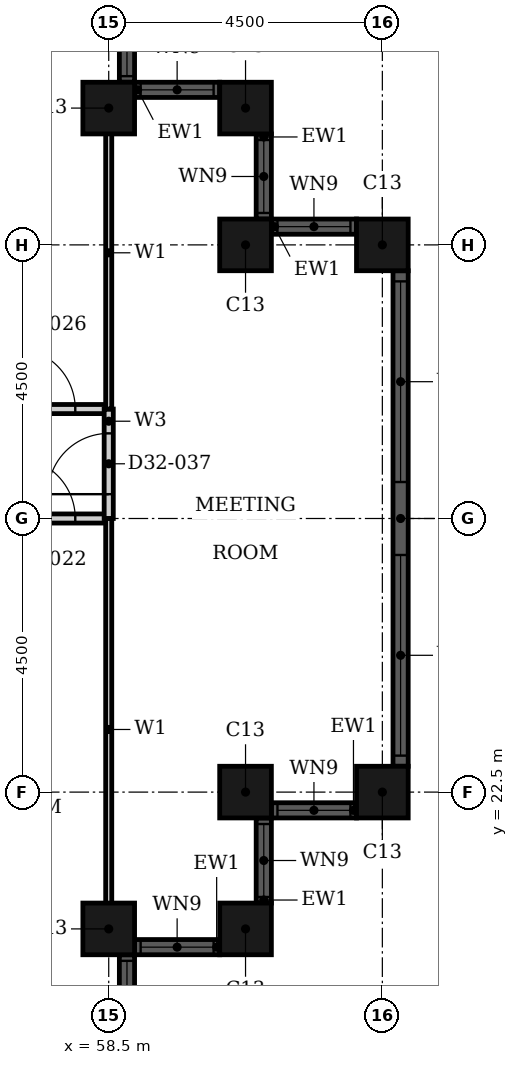
"""IFC4 building model, lengths in metres.
Left out: names, types, materials, properties, quantities, classifications, styles, units other than length and angle.
Written with IfcOpenShell. Run it as: python <this file> out.ifc"""

import sys

from ifc_helpers import new_model, si_unit, direction, frame, frame_2d, origin, origin_2d, place, context, subcontext, project, spatial, rectangle, hollow_rectangle, extrude, element, fill, save


model = new_model("IFC4")
c1 = context("Model", 3, precision=1e-05, world=origin(), true_north=direction((0.0, 1.0)))
c2 = subcontext(c1, "Body", "Model", "MODEL_VIEW")
j1 = project(units=[si_unit("LENGTHUNIT", "METRE"), si_unit("PLANEANGLEUNIT", "RADIAN")], contexts=[c1])
p1 = place(None, origin())
s1 = spatial("IfcSite", under=j1, at=p1, CompositionType="ELEMENT")
p2 = place(p1, origin())
s2 = spatial("IfcBuilding", under=s1, at=p2, CompositionType="ELEMENT")
p3 = place(p2, frame((0.0, 0.0, 129.6)))
s3 = spatial("IfcBuildingStorey", under=s2, at=p3, CompositionType="ELEMENT", Elevation=129.6)
for number, where, z_axis, x_axis in (
    (1, (58.5, 20.25, 0.0), (0.0, 0.0, 1.0), (1.0, 0.0, 0.0)),
    (2, (60.75, 20.25, 0.0), (0.0, 0.0, 1.0), (1.0, 0.0, 0.0)),
    (3, (60.75, 22.5, 0.0), (0.0, 0.0, 1.0), (1.0, 0.0, 0.0)),
    (4, (63.0, 22.5, 0.0), (0.0, 0.0, 1.0), (1.0, 0.0, 0.0)),
    (5, (63.0, 31.5, 0.0), (0.0, 0.0, 1.0), (1.0, 0.0, 0.0)),
    (6, (60.75, 31.5, 0.0), (0.0, 0.0, 1.0), (1.0, 0.0, 0.0)),
    (7, (60.75, 33.75, 0.0), (0.0, 0.0, 1.0), (1.0, 0.0, 0.0)),
    (8, (58.5, 33.75, 0.0), (0.0, 0.0, 1.0), (1.0, 0.0, 0.0)),
):
    element("IfcColumn", number, at=place(p3, frame(where, z_axis=z_axis, x_axis=x_axis)), inside=s3, PredefinedType="COLUMN", context=c2, shape_type="SweptSolid", body=[
        extrude(hollow_rectangle(XDim=0.85, YDim=0.85, WallThickness=0.026, at=origin_2d()), origin(), (0.0, 0.0, 1.0), 3.6),
    ])
p4 = place(p3, frame((58.8, 18.425, 0.0), z_axis=(0.0, 0.0, 1.0), x_axis=(0.0, 1.0, 0.0)))
e9 = element("IfcWall", 9, at=p4, inside=s3, PredefinedType="SOLIDWALL", context=c2, shape_type="SweptSolid", body=[
    extrude(rectangle(XDim=1.4, YDim=0.25, at=frame_2d((0.7, 0.0))), origin(), (0.0, 0.0, 1.0), 3.6),
])
p5 = place(p4, frame((0.1, 0.0, 0.9)))
e10 = element("IfcOpeningElement", 10, at=p5, cuts=e9, PredefinedType="OPENING", context=c2, shape_type="SweptSolid", body=[
    extrude(rectangle(XDim=1.2, YDim=2.08, at=frame_2d((0.6, 1.04))), frame((0.0, 0.135, 0.0), z_axis=(0.0, -1.0, 0.0), x_axis=(1.0, 0.0, 0.0)), (0.0, 0.0, 1.0), 0.27),
])
p6 = place(p3, frame((58.925, 19.95, 0.0), z_axis=(0.0, 0.0, 1.0), x_axis=(1.0, 0.0, 0.0)))
e11 = element("IfcWall", 11, at=p6, inside=s3, PredefinedType="SOLIDWALL", context=c2, shape_type="SweptSolid", body=[
    extrude(rectangle(XDim=1.4, YDim=0.25, at=frame_2d((0.7, 0.0))), origin(), (0.0, 0.0, 1.0), 3.6),
])
p7 = place(p6, frame((0.1, 0.0, 0.9)))
e12 = element("IfcOpeningElement", 12, at=p7, cuts=e11, PredefinedType="OPENING", context=c2, shape_type="SweptSolid", body=[
    extrude(rectangle(XDim=1.2, YDim=2.08, at=frame_2d((0.6, 1.04))), frame((0.0, 0.135, 0.0), z_axis=(0.0, -1.0, 0.0), x_axis=(1.0, 0.0, 0.0)), (0.0, 0.0, 1.0), 0.27),
])
p8 = place(p3, frame((61.05, 20.675, 0.0), z_axis=(0.0, 0.0, 1.0), x_axis=(0.0, 1.0, 0.0)))
e13 = element("IfcWall", 13, at=p8, inside=s3, PredefinedType="SOLIDWALL", context=c2, shape_type="SweptSolid", body=[
    extrude(rectangle(XDim=1.4, YDim=0.25, at=frame_2d((0.7, 0.0))), origin(), (0.0, 0.0, 1.0), 3.6),
])
p9 = place(p8, frame((0.1, 0.0, 0.9)))
e14 = element("IfcOpeningElement", 14, at=p9, cuts=e13, PredefinedType="OPENING", context=c2, shape_type="SweptSolid", body=[
    extrude(rectangle(XDim=1.2, YDim=2.08, at=frame_2d((0.6, 1.04))), frame((0.0, 0.135, 0.0), z_axis=(0.0, -1.0, 0.0), x_axis=(1.0, 0.0, 0.0)), (0.0, 0.0, 1.0), 0.27),
])
p10 = place(p3, frame((61.175, 22.2, 0.0), z_axis=(0.0, 0.0, 1.0), x_axis=(1.0, 0.0, 0.0)))
e15 = element("IfcWall", 15, at=p10, inside=s3, PredefinedType="SOLIDWALL", context=c2, shape_type="SweptSolid", body=[
    extrude(rectangle(XDim=1.4, YDim=0.25, at=frame_2d((0.7, 0.0))), origin(), (0.0, 0.0, 1.0), 3.6),
])
p11 = place(p10, frame((0.1, 0.0, 0.9)))
e16 = element("IfcOpeningElement", 16, at=p11, cuts=e15, PredefinedType="OPENING", context=c2, shape_type="SweptSolid", body=[
    extrude(rectangle(XDim=1.2, YDim=2.08, at=frame_2d((0.6, 1.04))), frame((0.0, 0.135, 0.0), z_axis=(0.0, -1.0, 0.0), x_axis=(1.0, 0.0, 0.0)), (0.0, 0.0, 1.0), 0.27),
])
p12 = place(p3, frame((63.3, 22.925, 0.0), z_axis=(0.0, 0.0, 1.0), x_axis=(0.0, 1.0, 0.0)))
e17 = element("IfcWall", 17, at=p12, inside=s3, PredefinedType="SOLIDWALL", context=c2, shape_type="SweptSolid", body=[
    extrude(rectangle(XDim=8.15, YDim=0.25, at=frame_2d((4.075, 0.0))), origin(), (0.0, 0.0, 1.0), 3.6),
])
p13 = place(p12, frame((0.175, 0.0, 0.9)))
e18 = element("IfcOpeningElement", 18, at=p13, cuts=e17, PredefinedType="OPENING", context=c2, shape_type="SweptSolid", body=[
    extrude(rectangle(XDim=3.3, YDim=2.08, at=frame_2d((1.65, 1.04))), frame((0.0, 0.135, 0.0), z_axis=(0.0, -1.0, 0.0), x_axis=(1.0, 0.0, 0.0)), (0.0, 0.0, 1.0), 0.27),
])
p14 = place(p12, frame((4.675, 0.0, 0.9)))
e19 = element("IfcOpeningElement", 19, at=p14, cuts=e17, PredefinedType="OPENING", context=c2, shape_type="SweptSolid", body=[
    extrude(rectangle(XDim=3.3, YDim=2.08, at=frame_2d((1.65, 1.04))), frame((0.0, 0.135, 0.0), z_axis=(0.0, -1.0, 0.0), x_axis=(1.0, 0.0, 0.0)), (0.0, 0.0, 1.0), 0.27),
])
p15 = place(p3, frame((62.575, 31.8, 0.0), z_axis=(0.0, 0.0, 1.0), x_axis=(-1.0, 0.0, 0.0)))
e20 = element("IfcWall", 20, at=p15, inside=s3, PredefinedType="SOLIDWALL", context=c2, shape_type="SweptSolid", body=[
    extrude(rectangle(XDim=1.4, YDim=0.25, at=frame_2d((0.7, 0.0))), origin(), (0.0, 0.0, 1.0), 3.6),
])
p16 = place(p15, frame((0.1, 0.0, 0.9)))
e21 = element("IfcOpeningElement", 21, at=p16, cuts=e20, PredefinedType="OPENING", context=c2, shape_type="SweptSolid", body=[
    extrude(rectangle(XDim=1.2, YDim=2.08, at=frame_2d((0.6, 1.04))), frame((0.0, 0.135, 0.0), z_axis=(0.0, -1.0, 0.0), x_axis=(1.0, 0.0, 0.0)), (0.0, 0.0, 1.0), 0.27),
])
p17 = place(p3, frame((61.05, 31.925, 0.0), z_axis=(0.0, 0.0, 1.0), x_axis=(0.0, 1.0, 0.0)))
e22 = element("IfcWall", 22, at=p17, inside=s3, PredefinedType="SOLIDWALL", context=c2, shape_type="SweptSolid", body=[
    extrude(rectangle(XDim=1.4, YDim=0.25, at=frame_2d((0.7, 0.0))), origin(), (0.0, 0.0, 1.0), 3.6),
])
p18 = place(p17, frame((0.1, 0.0, 0.9)))
e23 = element("IfcOpeningElement", 23, at=p18, cuts=e22, PredefinedType="OPENING", context=c2, shape_type="SweptSolid", body=[
    extrude(rectangle(XDim=1.2, YDim=2.08, at=frame_2d((0.6, 1.04))), frame((0.0, 0.135, 0.0), z_axis=(0.0, -1.0, 0.0), x_axis=(1.0, 0.0, 0.0)), (0.0, 0.0, 1.0), 0.27),
])
p19 = place(p3, frame((60.325, 34.05, 0.0), z_axis=(0.0, 0.0, 1.0), x_axis=(-1.0, 0.0, 0.0)))
e24 = element("IfcWall", 24, at=p19, inside=s3, PredefinedType="SOLIDWALL", context=c2, shape_type="SweptSolid", body=[
    extrude(rectangle(XDim=1.4, YDim=0.25, at=frame_2d((0.7, 0.0))), origin(), (0.0, 0.0, 1.0), 3.6),
])
p20 = place(p19, frame((0.1, 0.0, 0.9)))
e25 = element("IfcOpeningElement", 25, at=p20, cuts=e24, PredefinedType="OPENING", context=c2, shape_type="SweptSolid", body=[
    extrude(rectangle(XDim=1.2, YDim=2.08, at=frame_2d((0.6, 1.04))), frame((0.0, 0.135, 0.0), z_axis=(0.0, -1.0, 0.0), x_axis=(1.0, 0.0, 0.0)), (0.0, 0.0, 1.0), 0.27),
])
p21 = place(p3, frame((58.8, 34.175, 0.0), z_axis=(0.0, 0.0, 1.0), x_axis=(0.0, 1.0, 0.0)))
e26 = element("IfcWall", 26, at=p21, inside=s3, PredefinedType="SOLIDWALL", context=c2, shape_type="SweptSolid", body=[
    extrude(rectangle(XDim=1.4, YDim=0.25, at=frame_2d((0.7, 0.0))), origin(), (0.0, 0.0, 1.0), 3.6),
])
p22 = place(p21, frame((0.1, 0.0, 0.9)))
e27 = element("IfcOpeningElement", 27, at=p22, cuts=e26, PredefinedType="OPENING", context=c2, shape_type="SweptSolid", body=[
    extrude(rectangle(XDim=1.2, YDim=2.08, at=frame_2d((0.6, 1.04))), frame((0.0, 0.135, 0.0), z_axis=(0.0, -1.0, 0.0), x_axis=(1.0, 0.0, 0.0)), (0.0, 0.0, 1.0), 0.27),
])
p23 = place(p3, frame((46.8, 27.0, 0.0), z_axis=(0.0, 0.0, 1.0), x_axis=(1.0, 0.0, 0.0)))
e28 = element("IfcWall", 28, at=p23, inside=s3, PredefinedType="PARTITIONING", context=c2, shape_type="SweptSolid", body=[
    extrude(rectangle(XDim=11.7, YDim=0.15, at=frame_2d((5.85, 0.0))), origin(), (0.0, 0.0, 1.0), 2.58),
])
p24 = place(p23, frame((5.65, 0.0, 0.0)))
e29 = element("IfcOpeningElement", 29, at=p24, cuts=e28, PredefinedType="OPENING", context=c2, shape_type="SweptSolid", body=[
    extrude(rectangle(XDim=1.0, YDim=2.1, at=frame_2d((0.5, 1.05))), frame((0.0, 0.085, 0.0), z_axis=(0.0, -1.0, 0.0), x_axis=(1.0, 0.0, 0.0)), (0.0, 0.0, 1.0), 0.17),
])
p25 = place(p23, frame((10.15, 0.0, 0.0)))
e30 = element("IfcOpeningElement", 30, at=p25, cuts=e28, PredefinedType="OPENING", context=c2, shape_type="SweptSolid", body=[
    extrude(rectangle(XDim=1.0, YDim=2.1, at=frame_2d((0.5, 1.05))), frame((0.0, 0.085, 0.0), z_axis=(0.0, -1.0, 0.0), x_axis=(1.0, 0.0, 0.0)), (0.0, 0.0, 1.0), 0.17),
])
p26 = place(p3, frame((46.8, 28.8, 0.0), z_axis=(0.0, 0.0, 1.0), x_axis=(1.0, 0.0, 0.0)))
e31 = element("IfcWall", 31, at=p26, inside=s3, PredefinedType="PARTITIONING", context=c2, shape_type="SweptSolid", body=[
    extrude(rectangle(XDim=11.7, YDim=0.15, at=frame_2d((5.85, 0.0))), origin(), (0.0, 0.0, 1.0), 3.3),
])
p27 = place(p26, frame((5.65, 0.0, 0.0)))
e32 = element("IfcOpeningElement", 32, at=p27, cuts=e31, PredefinedType="OPENING", context=c2, shape_type="SweptSolid", body=[
    extrude(rectangle(XDim=1.0, YDim=2.1, at=frame_2d((0.5, 1.05))), frame((0.0, 0.085, 0.0), z_axis=(0.0, -1.0, 0.0), x_axis=(1.0, 0.0, 0.0)), (0.0, 0.0, 1.0), 0.17),
])
p28 = place(p26, frame((10.15, 0.0, 0.0)))
e33 = element("IfcOpeningElement", 33, at=p28, cuts=e31, PredefinedType="OPENING", context=c2, shape_type="SweptSolid", body=[
    extrude(rectangle(XDim=1.0, YDim=2.1, at=frame_2d((0.5, 1.05))), frame((0.0, 0.085, 0.0), z_axis=(0.0, -1.0, 0.0), x_axis=(1.0, 0.0, 0.0)), (0.0, 0.0, 1.0), 0.17),
])
p29 = place(p3, frame((58.5, 27.0, 0.0), z_axis=(0.0, 0.0, 1.0), x_axis=(0.0, 1.0, 0.0)))
e34 = element("IfcWall", 34, at=p29, inside=s3, PredefinedType="PARTITIONING", context=c2, shape_type="SweptSolid", body=[
    extrude(rectangle(XDim=1.8, YDim=0.15, at=frame_2d((0.9, 0.0))), origin(), (0.0, 0.0, 1.0), 3.3),
])
p30 = place(p29, frame((0.4, 0.0, 0.0)))
e35 = element("IfcOpeningElement", 35, at=p30, cuts=e34, PredefinedType="OPENING", context=c2, shape_type="SweptSolid", body=[
    extrude(rectangle(XDim=1.0, YDim=2.1, at=frame_2d((0.5, 1.05))), frame((0.0, 0.085, 0.0), z_axis=(0.0, -1.0, 0.0), x_axis=(1.0, 0.0, 0.0)), (0.0, 0.0, 1.0), 0.17),
])
p31 = place(p3, frame((58.5, 28.8, 0.0), z_axis=(0.0, 0.0, 1.0), x_axis=(0.0, 1.0, 0.0)))
e36 = element("IfcWall", 36, at=p31, inside=s3, PredefinedType="PARTITIONING", context=c2, shape_type="SweptSolid", body=[
    extrude(rectangle(XDim=5.14, YDim=0.1, at=frame_2d((2.57, 0.0))), origin(), (0.0, 0.0, 1.0), 3.3),
])
p32 = place(p3, frame((58.5, 20.06, 0.0), z_axis=(0.0, 0.0, 1.0), x_axis=(0.0, 1.0, 0.0)))
e37 = element("IfcWall", 37, at=p32, inside=s3, PredefinedType="PARTITIONING", context=c2, shape_type="SweptSolid", body=[
    extrude(rectangle(XDim=6.94, YDim=0.1, at=frame_2d((3.47, 0.0))), origin(), (0.0, 0.0, 1.0), 3.3),
])
p33 = place(p5, origin())
e38 = element("IfcWindow", 38, at=p33, inside=s3, PartitioningType="SINGLE_PANEL", PredefinedType="WINDOW", context=c2, shape_type="SweptSolid", body=[
    extrude(rectangle(XDim=1.2, YDim=2.08, at=frame_2d((0.6, 1.04))), frame((0.0, 0.03, 0.0), z_axis=(0.0, -1.0, 0.0), x_axis=(1.0, 0.0, 0.0)), (0.0, 0.0, 1.0), 0.06),
])
fill(e10, e38)
p34 = place(p7, origin())
e39 = element("IfcWindow", 39, at=p34, inside=s3, PartitioningType="SINGLE_PANEL", PredefinedType="WINDOW", context=c2, shape_type="SweptSolid", body=[
    extrude(rectangle(XDim=1.2, YDim=2.08, at=frame_2d((0.6, 1.04))), frame((0.0, 0.03, 0.0), z_axis=(0.0, -1.0, 0.0), x_axis=(1.0, 0.0, 0.0)), (0.0, 0.0, 1.0), 0.06),
])
fill(e12, e39)
p35 = place(p9, origin())
e40 = element("IfcWindow", 40, at=p35, inside=s3, PartitioningType="SINGLE_PANEL", PredefinedType="WINDOW", context=c2, shape_type="SweptSolid", body=[
    extrude(rectangle(XDim=1.2, YDim=2.08, at=frame_2d((0.6, 1.04))), frame((0.0, 0.03, 0.0), z_axis=(0.0, -1.0, 0.0), x_axis=(1.0, 0.0, 0.0)), (0.0, 0.0, 1.0), 0.06),
])
fill(e14, e40)
p36 = place(p11, origin())
e41 = element("IfcWindow", 41, at=p36, inside=s3, PartitioningType="SINGLE_PANEL", PredefinedType="WINDOW", context=c2, shape_type="SweptSolid", body=[
    extrude(rectangle(XDim=1.2, YDim=2.08, at=frame_2d((0.6, 1.04))), frame((0.0, 0.03, 0.0), z_axis=(0.0, -1.0, 0.0), x_axis=(1.0, 0.0, 0.0)), (0.0, 0.0, 1.0), 0.06),
])
fill(e16, e41)
p37 = place(p13, origin())
e42 = element("IfcWindow", 42, at=p37, inside=s3, PartitioningType="SINGLE_PANEL", PredefinedType="WINDOW", context=c2, shape_type="SweptSolid", body=[
    extrude(rectangle(XDim=3.3, YDim=2.08, at=frame_2d((1.65, 1.04))), frame((0.0, 0.03, 0.0), z_axis=(0.0, -1.0, 0.0), x_axis=(1.0, 0.0, 0.0)), (0.0, 0.0, 1.0), 0.06),
])
fill(e18, e42)
p38 = place(p14, origin())
e43 = element("IfcWindow", 43, at=p38, inside=s3, PartitioningType="SINGLE_PANEL", PredefinedType="WINDOW", context=c2, shape_type="SweptSolid", body=[
    extrude(rectangle(XDim=3.3, YDim=2.08, at=frame_2d((1.65, 1.04))), frame((0.0, 0.03, 0.0), z_axis=(0.0, -1.0, 0.0), x_axis=(1.0, 0.0, 0.0)), (0.0, 0.0, 1.0), 0.06),
])
fill(e19, e43)
p39 = place(p16, origin())
e44 = element("IfcWindow", 44, at=p39, inside=s3, PartitioningType="SINGLE_PANEL", PredefinedType="WINDOW", context=c2, shape_type="SweptSolid", body=[
    extrude(rectangle(XDim=1.2, YDim=2.08, at=frame_2d((0.6, 1.04))), frame((0.0, 0.03, 0.0), z_axis=(0.0, -1.0, 0.0), x_axis=(1.0, 0.0, 0.0)), (0.0, 0.0, 1.0), 0.06),
])
fill(e21, e44)
p40 = place(p18, origin())
e45 = element("IfcWindow", 45, at=p40, inside=s3, PartitioningType="SINGLE_PANEL", PredefinedType="WINDOW", context=c2, shape_type="SweptSolid", body=[
    extrude(rectangle(XDim=1.2, YDim=2.08, at=frame_2d((0.6, 1.04))), frame((0.0, 0.03, 0.0), z_axis=(0.0, -1.0, 0.0), x_axis=(1.0, 0.0, 0.0)), (0.0, 0.0, 1.0), 0.06),
])
fill(e23, e45)
p41 = place(p20, origin())
e46 = element("IfcWindow", 46, at=p41, inside=s3, PartitioningType="SINGLE_PANEL", PredefinedType="WINDOW", context=c2, shape_type="SweptSolid", body=[
    extrude(rectangle(XDim=1.2, YDim=2.08, at=frame_2d((0.6, 1.04))), frame((0.0, 0.03, 0.0), z_axis=(0.0, -1.0, 0.0), x_axis=(1.0, 0.0, 0.0)), (0.0, 0.0, 1.0), 0.06),
])
fill(e25, e46)
p42 = place(p22, origin())
e47 = element("IfcWindow", 47, at=p42, inside=s3, PartitioningType="SINGLE_PANEL", PredefinedType="WINDOW", context=c2, shape_type="SweptSolid", body=[
    extrude(rectangle(XDim=1.2, YDim=2.08, at=frame_2d((0.6, 1.04))), frame((0.0, 0.03, 0.0), z_axis=(0.0, -1.0, 0.0), x_axis=(1.0, 0.0, 0.0)), (0.0, 0.0, 1.0), 0.06),
])
fill(e27, e47)
p43 = place(p25, origin())
e48 = element("IfcDoor", 48, at=p43, inside=s3, OperationType="SINGLE_SWING_RIGHT", PredefinedType="DOOR", context=c2, shape_type="SweptSolid", body=[
    extrude(rectangle(XDim=1.0, YDim=2.1, at=frame_2d((0.5, 1.05))), frame((0.0, 0.025, 0.0), z_axis=(0.0, -1.0, 0.0), x_axis=(1.0, 0.0, 0.0)), (0.0, 0.0, 1.0), 0.05),
])
fill(e30, e48)
p44 = place(p28, origin())
e49 = element("IfcDoor", 49, at=p44, inside=s3, OperationType="SINGLE_SWING_RIGHT", PredefinedType="DOOR", context=c2, shape_type="SweptSolid", body=[
    extrude(rectangle(XDim=1.0, YDim=2.1, at=frame_2d((0.5, 1.05))), frame((0.0, 0.025, 0.0), z_axis=(0.0, -1.0, 0.0), x_axis=(1.0, 0.0, 0.0)), (0.0, 0.0, 1.0), 0.05),
])
fill(e33, e49)
p45 = place(p30, origin())
e50 = element("IfcDoor", 50, at=p45, inside=s3, OperationType="SINGLE_SWING_LEFT", PredefinedType="DOOR", context=c2, shape_type="SweptSolid", body=[
    extrude(rectangle(XDim=1.0, YDim=2.1, at=frame_2d((0.5, 1.05))), frame((0.0, 0.025, 0.0), z_axis=(0.0, -1.0, 0.0), x_axis=(1.0, 0.0, 0.0)), (0.0, 0.0, 1.0), 0.05),
])
fill(e35, e50)
save(model, sys.argv[1])
